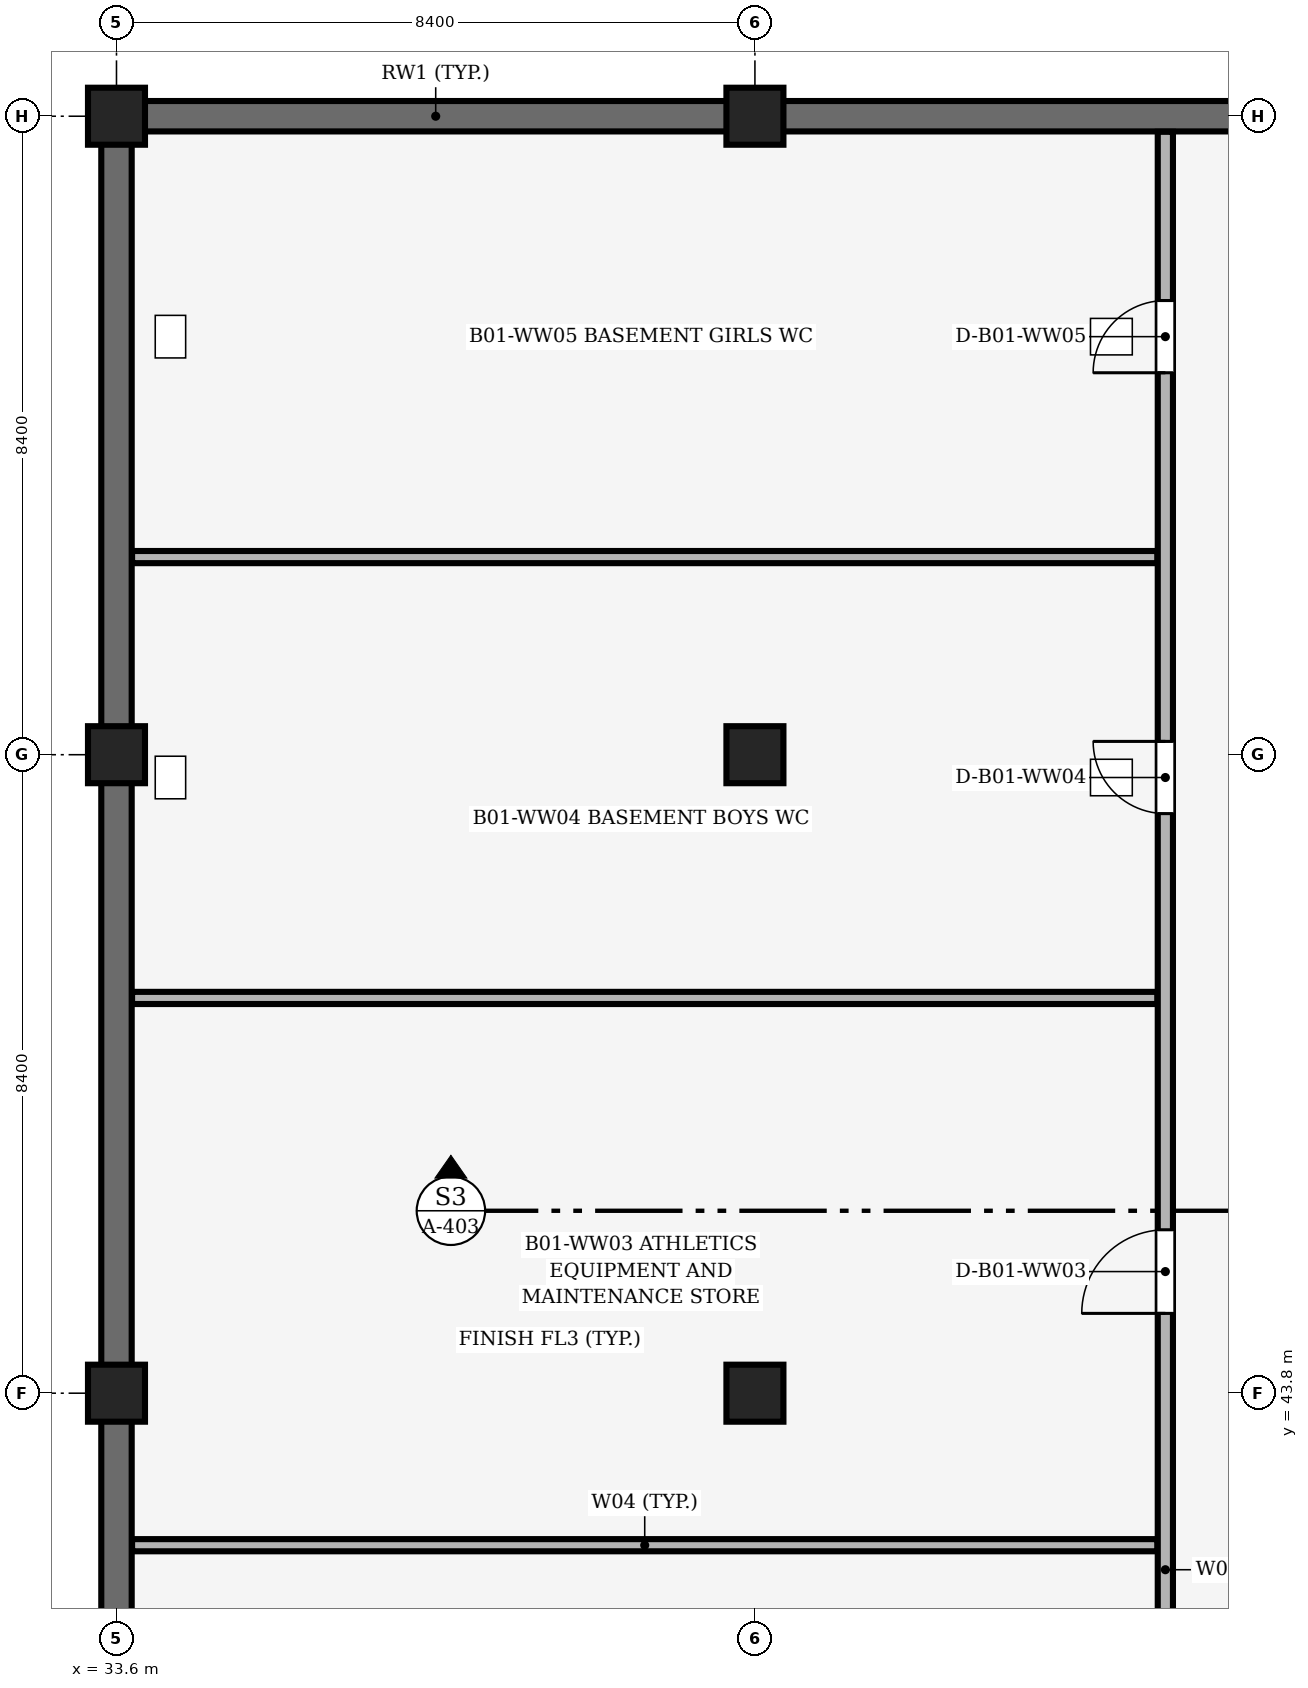
"""IFC4 building model, lengths in metres.
Left out: names, types, materials, properties, quantities, classifications, styles, units other than length and angle.
Written with IfcOpenShell. Run it as: python <this file> out.ifc"""

import sys

from ifc_helpers import new_model, si_unit, direction, frame, frame_2d, origin, origin_2d, place, context, subcontext, project, spatial, rectangle, extrude, element, fill, save


model = new_model("IFC4")
c1 = context("Model", 3, precision=1e-05, world=origin(), true_north=direction((0.0, 1.0)))
c2 = subcontext(c1, "Body", "Model", "MODEL_VIEW")
j1 = project(units=[si_unit("LENGTHUNIT", "METRE"), si_unit("PLANEANGLEUNIT", "RADIAN")], contexts=[c1])
p1 = place(None, origin())
s1 = spatial("IfcSite", under=j1, at=p1, CompositionType="ELEMENT")
p2 = place(p1, origin())
s2 = spatial("IfcBuilding", under=s1, at=p2, CompositionType="ELEMENT")
p3 = place(p2, frame((0.0, 0.0, -4.2)))
s3 = spatial("IfcBuildingStorey", under=s2, at=p3, CompositionType="ELEMENT", Elevation=-4.2)
for number, where, z_axis, x_axis in (
    (1, (33.6, 43.8, 0.0), (0.0, 0.0, 1.0), (1.0, 0.0, 0.0)),
    (2, (33.6, 52.2, 0.0), (0.0, 0.0, 1.0), (1.0, 0.0, 0.0)),
    (3, (33.6, 60.6, 0.0), (0.0, 0.0, 1.0), (1.0, 0.0, 0.0)),
    (4, (42.0, 43.8, 0.0), (0.0, 0.0, 1.0), (1.0, 0.0, 0.0)),
    (5, (42.0, 52.2, 0.0), (0.0, 0.0, 1.0), (1.0, 0.0, 0.0)),
    (6, (42.0, 60.6, 0.0), (0.0, 0.0, 1.0), (1.0, 0.0, 0.0)),
):
    element("IfcColumn", number, at=place(p3, frame(where, z_axis=z_axis, x_axis=x_axis)), inside=s3, PredefinedType="COLUMN", context=c2, shape_type="SweptSolid", body=[
        extrude(rectangle(XDim=0.75, YDim=0.75, at=origin_2d()), origin(), (0.0, 0.0, 1.0), 4.2),
    ])
p4 = place(p3, frame((33.95, 60.6, 0.0), z_axis=(0.0, 0.0, 1.0), x_axis=(1.0, 0.0, 0.0)))
e7 = element("IfcWall", 7, at=p4, inside=s3, PredefinedType="SHEAR", context=c2, shape_type="SweptSolid", body=[
    extrude(rectangle(XDim=7.7, YDim=0.4, at=frame_2d((3.85, 0.0))), origin(), (0.0, 0.0, 1.0), 3.9),
])
p5 = place(p3, frame((42.35, 60.6, 0.0), z_axis=(0.0, 0.0, 1.0), x_axis=(1.0, 0.0, 0.0)))
e8 = element("IfcWall", 8, at=p5, inside=s3, PredefinedType="SHEAR", context=c2, shape_type="SweptSolid", body=[
    extrude(rectangle(XDim=7.7, YDim=0.4, at=frame_2d((3.85, 0.0))), origin(), (0.0, 0.0, 1.0), 3.15),
])
p6 = place(p3, frame((33.6, 35.75, 0.0), z_axis=(0.0, 0.0, 1.0), x_axis=(0.0, 1.0, 0.0)))
e9 = element("IfcWall", 9, at=p6, inside=s3, PredefinedType="SHEAR", context=c2, shape_type="SweptSolid", body=[
    extrude(rectangle(XDim=7.7, YDim=0.4, at=frame_2d((3.85, 0.0))), origin(), (0.0, 0.0, 1.0), 3.25),
])
p7 = place(p3, frame((33.6, 44.15, 0.0), z_axis=(0.0, 0.0, 1.0), x_axis=(0.0, 1.0, 0.0)))
e10 = element("IfcWall", 10, at=p7, inside=s3, PredefinedType="SHEAR", context=c2, shape_type="SweptSolid", body=[
    extrude(rectangle(XDim=7.7, YDim=0.4, at=frame_2d((3.85, 0.0))), origin(), (0.0, 0.0, 1.0), 3.2),
])
p8 = place(p3, frame((33.6, 52.55, 0.0), z_axis=(0.0, 0.0, 1.0), x_axis=(0.0, 1.0, 0.0)))
e11 = element("IfcWall", 11, at=p8, inside=s3, PredefinedType="SHEAR", context=c2, shape_type="SweptSolid", body=[
    extrude(rectangle(XDim=7.7, YDim=0.4, at=frame_2d((3.85, 0.0))), origin(), (0.0, 0.0, 1.0), 3.9),
])
for number, where, z_axis, x_axis in (
    (12, (33.805, 41.8, 0.0), (0.0, 0.0, 1.0), (1.0, 0.0, 0.0)),
    (13, (33.805, 49.0, 0.0), (0.0, 0.0, 1.0), (1.0, 0.0, 0.0)),
    (14, (33.805, 54.8, 0.0), (0.0, 0.0, 1.0), (1.0, 0.0, 0.0)),
):
    element("IfcWall", number, at=place(p3, frame(where, z_axis=z_axis, x_axis=x_axis)), inside=s3, PredefinedType="PARTITIONING", context=c2, shape_type="SweptSolid", body=[
        extrude(rectangle(XDim=13.49, YDim=0.16, at=frame_2d((6.745, 0.0))), origin(), (0.0, 0.0, 1.0), 3.9),
    ])
p9 = place(p3, frame((47.4, 22.56, 0.0), z_axis=(0.0, 0.0, 1.0), x_axis=(0.0, 1.0, 0.0)))
e15 = element("IfcWall", 15, at=p9, inside=s3, PredefinedType="PARTITIONING", context=c2, shape_type="SweptSolid", body=[
    extrude(rectangle(XDim=37.835, YDim=0.2, at=frame_2d((18.917, 0.0))), origin(), (0.0, 0.0, 1.0), 3.9),
])
p10 = place(p9, frame((4.115, 0.0, 0.0)))
e16 = element("IfcOpeningElement", 16, at=p10, cuts=e15, PredefinedType="OPENING", context=c2, shape_type="SweptSolid", body=[
    extrude(rectangle(XDim=2.0, YDim=2.5, at=frame_2d((1.0, 1.25))), frame((0.0, 0.11, 0.0), z_axis=(0.0, -1.0, 0.0), x_axis=(1.0, 0.0, 0.0)), (0.0, 0.0, 1.0), 0.22),
])
p11 = place(p9, frame((13.74, 0.0, 0.0)))
e17 = element("IfcOpeningElement", 17, at=p11, cuts=e15, PredefinedType="OPENING", context=c2, shape_type="SweptSolid", body=[
    extrude(rectangle(XDim=1.4, YDim=2.2, at=frame_2d((0.7, 1.1))), frame((0.0, 0.11, 0.0), z_axis=(0.0, -1.0, 0.0), x_axis=(1.0, 0.0, 0.0)), (0.0, 0.0, 1.0), 0.22),
])
p12 = place(p9, frame((22.29, 0.0, 0.0)))
e18 = element("IfcOpeningElement", 18, at=p12, cuts=e15, PredefinedType="OPENING", context=c2, shape_type="SweptSolid", body=[
    extrude(rectangle(XDim=1.1, YDim=2.15, at=frame_2d((0.55, 1.075))), frame((0.0, 0.11, 0.0), z_axis=(0.0, -1.0, 0.0), x_axis=(1.0, 0.0, 0.0)), (0.0, 0.0, 1.0), 0.22),
])
p13 = place(p9, frame((28.865, 0.0, 0.0)))
e19 = element("IfcOpeningElement", 19, at=p13, cuts=e15, PredefinedType="OPENING", context=c2, shape_type="SweptSolid", body=[
    extrude(rectangle(XDim=0.95, YDim=2.2, at=frame_2d((0.475, 1.1))), frame((0.0, 0.11, 0.0), z_axis=(0.0, -1.0, 0.0), x_axis=(1.0, 0.0, 0.0)), (0.0, 0.0, 1.0), 0.22),
])
p14 = place(p9, frame((34.665, 0.0, 0.0)))
e20 = element("IfcOpeningElement", 20, at=p14, cuts=e15, PredefinedType="OPENING", context=c2, shape_type="SweptSolid", body=[
    extrude(rectangle(XDim=0.95, YDim=2.2, at=frame_2d((0.475, 1.1))), frame((0.0, 0.11, 0.0), z_axis=(0.0, -1.0, 0.0), x_axis=(1.0, 0.0, 0.0)), (0.0, 0.0, 1.0), 0.22),
])
p15 = place(p12, origin())
e21 = element("IfcDoor", 21, at=p15, inside=s3, OperationType="SINGLE_SWING_LEFT", PredefinedType="DOOR", context=c2, shape_type="SweptSolid", body=[
    extrude(rectangle(XDim=1.1, YDim=2.15, at=frame_2d((0.55, 1.075))), frame((0.0, 0.025, 0.0), z_axis=(0.0, -1.0, 0.0), x_axis=(1.0, 0.0, 0.0)), (0.0, 0.0, 1.0), 0.05),
])
fill(e18, e21)
p16 = place(p13, origin())
e22 = element("IfcDoor", 22, at=p16, inside=s3, OperationType="SINGLE_SWING_RIGHT", PredefinedType="DOOR", context=c2, shape_type="SweptSolid", body=[
    extrude(rectangle(XDim=0.95, YDim=2.2, at=frame_2d((0.475, 1.1))), frame((0.0, 0.025, 0.0), z_axis=(0.0, -1.0, 0.0), x_axis=(1.0, 0.0, 0.0)), (0.0, 0.0, 1.0), 0.05),
])
fill(e19, e22)
p17 = place(p14, origin())
e23 = element("IfcDoor", 23, at=p17, inside=s3, OperationType="SINGLE_SWING_LEFT", PredefinedType="DOOR", context=c2, shape_type="SweptSolid", body=[
    extrude(rectangle(XDim=0.95, YDim=2.2, at=frame_2d((0.475, 1.1))), frame((0.0, 0.025, 0.0), z_axis=(0.0, -1.0, 0.0), x_axis=(1.0, 0.0, 0.0)), (0.0, 0.0, 1.0), 0.05),
])
fill(e20, e23)
save(model, sys.argv[1])
